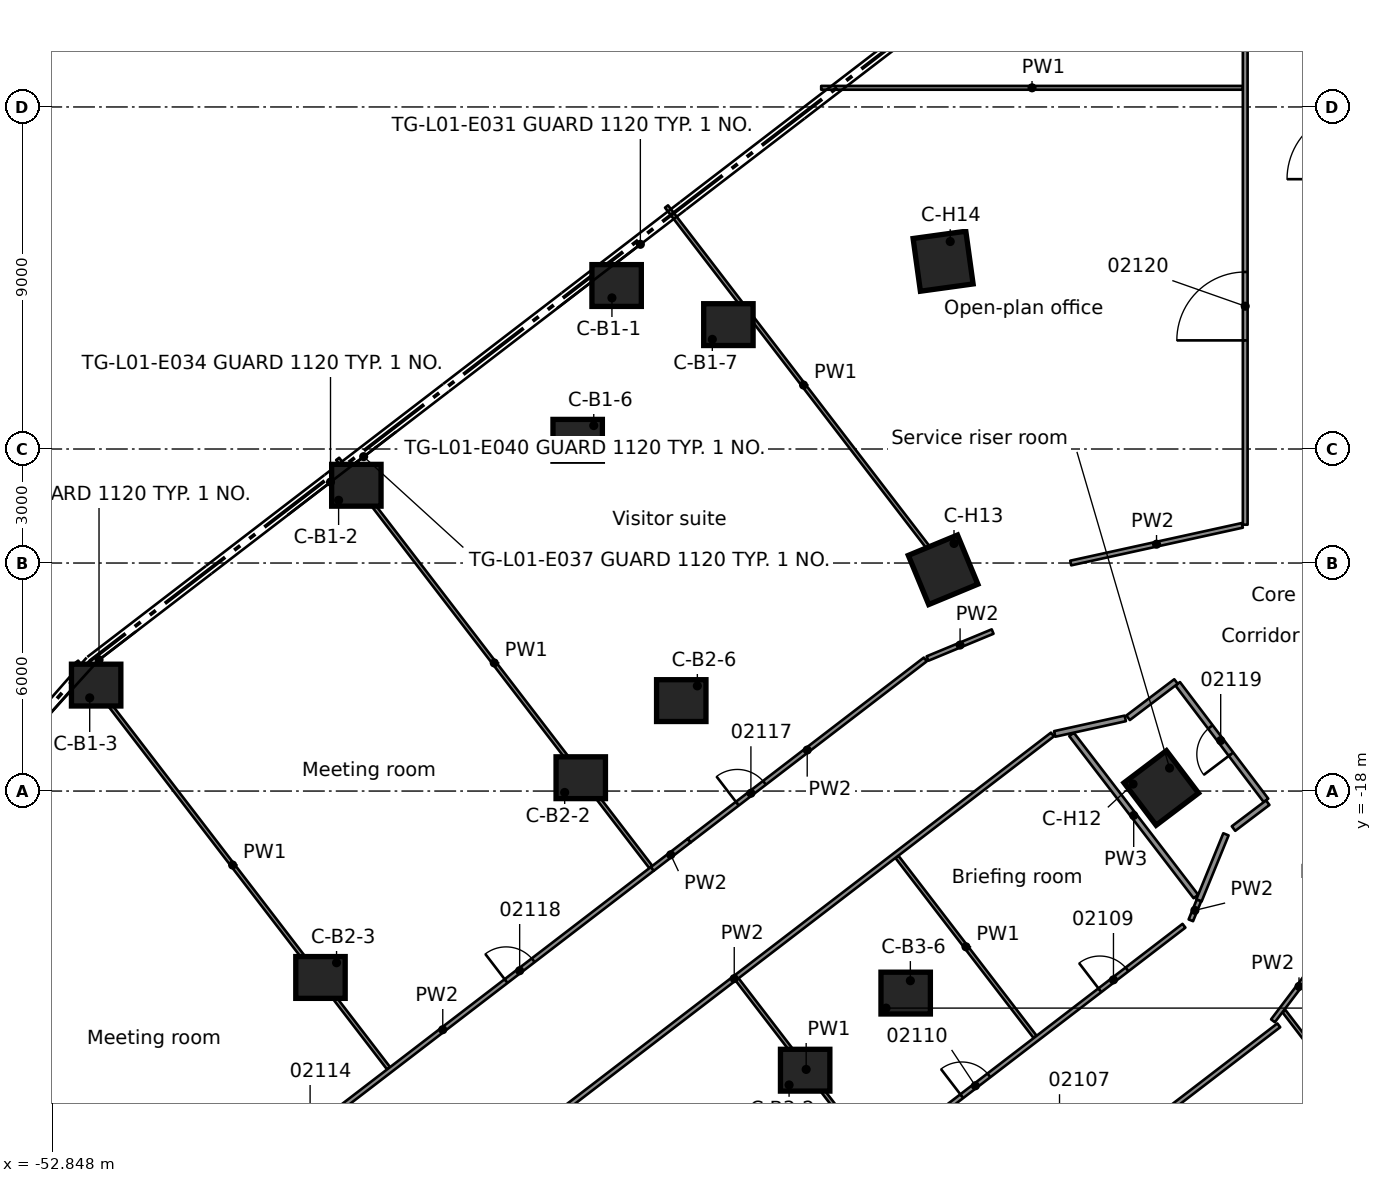
"""IFC4 building model, lengths in metres.
Left out: names, types, materials, properties, quantities, classifications, styles, units other than length and angle.
Written with IfcOpenShell. Run it as: python <this file> out.ifc"""

import sys

from ifc_helpers import new_model, si_unit, direction, frame, frame_2d, origin, origin_2d, place, context, subcontext, project, spatial, rectangle, extrude, element, fill, save


model = new_model("IFC4")
c1 = context("Model", 3, precision=1e-05, world=origin(), true_north=direction((0.0, 1.0)))
c2 = subcontext(c1, "Body", "Model", "MODEL_VIEW")
j1 = project(units=[si_unit("LENGTHUNIT", "METRE"), si_unit("PLANEANGLEUNIT", "RADIAN")], contexts=[c1])
p1 = place(None, origin())
s1 = spatial("IfcSite", under=j1, at=p1, CompositionType="ELEMENT")
p2 = place(p1, origin())
s2 = spatial("IfcBuilding", under=s1, at=p2, CompositionType="ELEMENT")
p3 = place(p2, frame((0.0, 0.0, 10.5)))
s3 = spatial("IfcBuildingStorey", under=s2, at=p3, CompositionType="ELEMENT", Elevation=10.5)
p4 = place(p3, frame((-37.991, -4.698, -1.0), z_axis=(0.0, 0.0, 1.0), x_axis=(0.707106781187, 0.707106781187, 0.0)))
e1 = element("IfcColumn", 1, at=p4, inside=s3, PredefinedType="COLUMN", context=c2, shape_type="SweptSolid", body=[
    extrude(rectangle(XDim=2.8, YDim=2.8, at=origin_2d()), origin(), (0.0, 0.0, 1.0), 1.0),
])
for number, where, z_axis, x_axis in (
    (2, (-44.84, -9.954, -1.0), (0.0, 0.0, 1.0), (0.707, 0.707, 0.0)),
    (3, (-51.687, -15.212, -1.0), (0.0, 0.0, 1.0), (0.707, 0.707, 0.0)),
    (4, (-54.884, -20.946, -1.0), (0.0, 0.0, 1.0), (0.707, 0.707, 0.0)),
    (5, (-39.016, -8.771, -1.0), (0.0, 0.0, 1.0), (0.707, 0.707, 0.0)),
):
    element("IfcColumn", number, at=place(p3, frame(where, z_axis=z_axis, x_axis=x_axis)), inside=s3, PredefinedType="COLUMN", context=c2, shape_type="SweptSolid", body=[
        extrude(rectangle(XDim=3.4, YDim=3.4, at=origin_2d()), origin(), (0.0, 0.0, 1.0), 1.0),
    ])
p5 = place(p3, frame((-35.05, -5.727, -1.0), z_axis=(0.0, 0.0, 1.0), x_axis=(0.707106781187, 0.707106781187, 0.0)))
e6 = element("IfcColumn", 6, at=p5, inside=s3, PredefinedType="COLUMN", context=c2, shape_type="SweptSolid", body=[
    extrude(rectangle(XDim=2.8, YDim=2.8, at=origin_2d()), origin(), (0.0, 0.0, 1.0), 1.0),
])
p6 = place(p3, frame((-38.935, -17.649, -1.0), z_axis=(0.0, 0.0, 1.0), x_axis=(0.707106781187, 0.707106781187, 0.0)))
e7 = element("IfcColumn", 7, at=p6, inside=s3, PredefinedType="COLUMN", context=c2, shape_type="SweptSolid", body=[
    extrude(rectangle(XDim=3.25, YDim=3.25, at=origin_2d()), origin(), (0.0, 0.0, 1.0), 1.0),
])
for number, where, z_axis, x_axis in (
    (8, (-45.784, -22.905, -1.0), (0.0, 0.0, 1.0), (0.707, 0.707, 0.0)),
    (9, (-52.633, -28.161, -1.0), (0.0, 0.0, 1.0), (0.707, 0.707, 0.0)),
):
    element("IfcColumn", number, at=place(p3, frame(where, z_axis=z_axis, x_axis=x_axis)), inside=s3, PredefinedType="COLUMN", context=c2, shape_type="SweptSolid", body=[
        extrude(rectangle(XDim=3.4, YDim=3.4, at=origin_2d()), origin(), (0.0, 0.0, 1.0), 1.0),
    ])
for number, where, z_axis, x_axis in (
    (10, (-36.29, -15.62, -1.0), (0.0, 0.0, 1.0), (0.707, 0.707, 0.0)),
    (11, (-33.03, -25.345, -1.0), (0.0, 0.0, 1.0), (0.707, 0.707, 0.0)),
    (12, (-30.385, -23.316, -1.0), (0.0, 0.0, 1.0), (0.707, 0.707, 0.0)),
):
    element("IfcColumn", number, at=place(p3, frame(where, z_axis=z_axis, x_axis=x_axis)), inside=s3, PredefinedType="COLUMN", context=c2, shape_type="SweptSolid", body=[
        extrude(rectangle(XDim=3.25, YDim=3.25, at=origin_2d()), origin(), (0.0, 0.0, 1.0), 1.0),
    ])
for number, where, z_axis, x_axis in (
    (13, (-20.99, -28.333, -1.0), (0.0, 0.0, 1.0), (0.707, 0.707, 0.0)),
    (14, (-17.919, -23.659, -1.0), (0.0, 0.0, 1.0), (0.707, 0.707, 0.0)),
    (15, (-23.659, -17.919, -1.0), (0.0, 0.0, 1.0), (0.707, 0.707, 0.0)),
    (16, (-29.4, -12.178, -1.0), (0.0, 0.0, 1.0), (0.707, 0.707, 0.0)),
    (17, (-29.4, -4.059, -1.0), (0.0, 0.0, 1.0), (0.707, 0.707, 0.0)),
):
    element("IfcColumn", number, at=place(p3, frame(where, z_axis=z_axis, x_axis=x_axis)), inside=s3, PredefinedType="COLUMN", context=c2, shape_type="SweptSolid", body=[
        extrude(rectangle(XDim=3.4, YDim=3.4, at=origin_2d()), origin(), (0.0, 0.0, 1.0), 1.0),
    ])
for number, where, z_axis, x_axis in (
    (18, (-37.991, -4.698, 0.0), (0.0, 0.0, 1.0), (1.0, 0.0, 0.0)),
    (19, (-44.84, -9.954, 0.0), (0.0, 0.0, 1.0), (1.0, 0.0, 0.0)),
    (20, (-51.687, -15.212, 0.0), (0.0, 0.0, 1.0), (1.0, 0.0, 0.0)),
    (21, (-39.016, -8.771, 0.0), (0.0, 0.0, 1.0), (1.0, 0.0, 0.0)),
    (22, (-35.05, -5.727, 0.0), (0.0, 0.0, 1.0), (1.0, 0.0, 0.0)),
    (23, (-38.935, -17.649, 0.0), (0.0, 0.0, 1.0), (1.0, 0.0, 0.0)),
    (24, (-45.784, -22.905, 0.0), (0.0, 0.0, 1.0), (1.0, 0.0, 0.0)),
    (25, (-36.29, -15.62, 0.0), (0.0, 0.0, 1.0), (1.0, 0.0, 0.0)),
    (26, (-33.03, -25.345, 0.0), (0.0, 0.0, 1.0), (1.0, 0.0, 0.0)),
    (27, (-30.385, -23.316, 0.0), (0.0, 0.0, 1.0), (1.0, 0.0, 0.0)),
):
    element("IfcColumn", number, at=place(p3, frame(where, z_axis=z_axis, x_axis=x_axis)), inside=s3, PredefinedType="COLUMN", context=c2, shape_type="SweptSolid", body=[
        extrude(rectangle(XDim=1.3, YDim=1.1, at=origin_2d()), origin(), (0.0, 0.0, 1.0), 5.0),
    ])
for number, where, z_axis, x_axis in (
    (28, (-23.659, -17.919, 0.0), (0.0, 0.0, 1.0), (-0.797, -0.604, 0.0)),
    (29, (-29.4, -12.178, 0.0), (0.0, 0.0, 1.0), (-0.924, -0.383, 0.0)),
    (30, (-29.4, -4.059, 0.0), (0.0, 0.0, 1.0), (-0.991, -0.137, 0.0)),
):
    element("IfcColumn", number, at=place(p3, frame(where, z_axis=z_axis, x_axis=x_axis)), inside=s3, PredefinedType="COLUMN", context=c2, shape_type="SweptSolid", body=[
        extrude(rectangle(XDim=1.4, YDim=1.4, at=origin_2d()), origin(), (0.0, 0.0, 1.0), 5.0),
    ])
p7 = place(p3, frame((-20.903, -18.246, 0.0), z_axis=(0.0, 0.0, 1.0), x_axis=(-0.603799066409, 0.797136555054, 0.0)))
e31 = element("IfcWall", 31, at=p7, inside=s3, PredefinedType="PARTITIONING", context=c2, shape_type="SweptSolid", body=[
    extrude(rectangle(XDim=3.849, YDim=0.15, at=frame_2d((1.924, 0.0))), origin(), (0.0, 0.0, 1.0), 4.58),
])
p8 = place(p7, frame((1.525, 0.0, 0.0)))
e32 = element("IfcOpeningElement", 32, at=p8, cuts=e31, PredefinedType="OPENING", context=c2, shape_type="SweptSolid", body=[
    extrude(rectangle(XDim=0.9, YDim=2.1, at=frame_2d((0.45, 1.05))), frame((0.0, 0.085, 0.0), z_axis=(0.0, -1.0, 0.0), x_axis=(1.0, 0.0, 0.0)), (0.0, 0.0, 1.0), 0.17),
])
p9 = place(p3, frame((-52.2, -14.599, 0.0), z_axis=(0.0, 0.0, 1.0), x_axis=(0.608835217765, -0.793296714735, 0.0)))
e33 = element("IfcWall", 33, at=p9, inside=s3, PredefinedType="PARTITIONING", context=c2, shape_type="SweptSolid", body=[
    extrude(rectangle(XDim=13.481, YDim=0.1, at=frame_2d((6.741, 0.0))), origin(), (0.0, 0.0, 1.0), 4.58),
])
p10 = place(p3, frame((-45.332, -9.26, 0.0), z_axis=(0.0, 0.0, 1.0), x_axis=(0.608825648604, -0.793304058733, 0.0)))
e34 = element("IfcWall", 34, at=p10, inside=s3, PredefinedType="PARTITIONING", context=c2, shape_type="SweptSolid", body=[
    extrude(rectangle(XDim=13.536, YDim=0.1, at=frame_2d((6.768, 0.0))), origin(), (0.0, 0.0, 1.0), 4.58),
])
p11 = place(p3, frame((-34.822, -22.955, 0.0), z_axis=(0.0, 0.0, 1.0), x_axis=(0.608823570319, -0.79330565372, 0.0)))
e35 = element("IfcWall", 35, at=p11, inside=s3, PredefinedType="PARTITIONING", context=c2, shape_type="SweptSolid", body=[
    extrude(rectangle(XDim=5.974, YDim=0.1, at=frame_2d((2.987, 0.0))), origin(), (0.0, 0.0, 1.0), 4.58),
])
p12 = place(p3, frame((-30.617, -19.729, 0.0), z_axis=(0.0, 0.0, 1.0), x_axis=(0.608902533452, -0.793245047104, 0.0)))
e36 = element("IfcWall", 36, at=p12, inside=s3, PredefinedType="PARTITIONING", context=c2, shape_type="SweptSolid", body=[
    extrude(rectangle(XDim=5.973, YDim=0.1, at=frame_2d((2.986, 0.0))), origin(), (0.0, 0.0, 1.0), 4.58),
])
p13 = place(p3, frame((-36.678, -2.619, 0.0), z_axis=(0.0, 0.0, 1.0), x_axis=(0.608769908396, -0.793346833757, 0.0)))
e37 = element("IfcWall", 37, at=p13, inside=s3, PredefinedType="PARTITIONING", context=c2, shape_type="SweptSolid", body=[
    extrude(rectangle(XDim=11.844, YDim=0.1, at=frame_2d((5.922, 0.0))), origin(), (0.0, 0.0, 1.0), 4.58),
])
p14 = place(p3, frame((-26.021, -16.509, 0.0), z_axis=(0.0, 0.0, 1.0), x_axis=(0.608806156611, -0.793319017592, 0.0)))
e38 = element("IfcWall", 38, at=p14, inside=s3, PredefinedType="PARTITIONING", context=c2, shape_type="SweptSolid", body=[
    extrude(rectangle(XDim=5.376, YDim=0.15, at=frame_2d((2.688, 0.0))), origin(), (0.0, 0.0, 1.0), 4.58),
])
p15 = place(p3, frame((-20.431, -23.791, 0.0), z_axis=(0.0, 0.0, 1.0), x_axis=(0.608708319694, -0.793394089678, 0.0)))
e39 = element("IfcWall", 39, at=p15, inside=s3, PredefinedType="PARTITIONING", context=c2, shape_type="SweptSolid", body=[
    extrude(rectangle(XDim=13.813, YDim=0.1, at=frame_2d((6.906, 0.0))), origin(), (0.0, 0.0, 1.0), 4.58),
])
p16 = place(p3, frame((-32.608, 0.504, 0.0), z_axis=(0.0, 0.0, 1.0), x_axis=(1.0, 0.0, 0.0)))
e40 = element("IfcWall", 40, at=p16, inside=s3, PredefinedType="PARTITIONING", context=c2, shape_type="SweptSolid", body=[
    extrude(rectangle(XDim=11.096, YDim=0.1, at=frame_2d((5.548, 0.0))), origin(), (0.0, 0.0, 1.0), 4.58),
])
p17 = place(p3, frame((-26.464, -16.497, 0.0), z_axis=(0.0, 0.0, 1.0), x_axis=(0.976601904513, 0.215055155954, 0.0)))
e41 = element("IfcWall", 41, at=p17, inside=s3, PredefinedType="PARTITIONING", context=c2, shape_type="SweptSolid", body=[
    extrude(rectangle(XDim=1.903, YDim=0.15, at=frame_2d((0.951, 0.0))), origin(), (0.0, 0.0, 1.0), 4.58),
])
p18 = place(p3, frame((-26.042, -12.0, 0.0), z_axis=(0.0, 0.0, 1.0), x_axis=(0.976761331961, 0.214329886822, 0.0)))
e42 = element("IfcWall", 42, at=p18, inside=s3, PredefinedType="PARTITIONING", context=c2, shape_type="SweptSolid", body=[
    extrude(rectangle(XDim=4.624, YDim=0.125, at=frame_2d((2.312, 0.0))), origin(), (0.0, 0.0, 1.0), 4.58),
])
p19 = place(p3, frame((-29.81, -14.513, 0.0), z_axis=(0.0, 0.0, 1.0), x_axis=(0.923811400228, 0.382847876851, 0.0)))
e43 = element("IfcWall", 43, at=p19, inside=s3, PredefinedType="PARTITIONING", context=c2, shape_type="SweptSolid", body=[
    extrude(rectangle(XDim=1.854, YDim=0.125, at=frame_2d((0.927, 0.0))), origin(), (0.0, 0.0, 1.0), 4.58),
])
p20 = place(p3, frame((-21.758, -18.987, 0.0), z_axis=(0.0, 0.0, 1.0), x_axis=(0.797423261737, 0.603420368931, 0.0)))
e44 = element("IfcWall", 44, at=p20, inside=s3, PredefinedType="PARTITIONING", context=c2, shape_type="SweptSolid", body=[
    extrude(rectangle(XDim=1.129, YDim=0.15, at=frame_2d((0.564, 0.0))), origin(), (0.0, 0.0, 1.0), 4.58),
])
p21 = place(p3, frame((-24.532, -16.072, 0.0), z_axis=(0.0, 0.0, 1.0), x_axis=(0.797229566058, 0.603676253469, 0.0)))
e45 = element("IfcWall", 45, at=p21, inside=s3, PredefinedType="PARTITIONING", context=c2, shape_type="SweptSolid", body=[
    extrude(rectangle(XDim=1.581, YDim=0.15, at=frame_2d((0.79, 0.0))), origin(), (0.0, 0.0, 1.0), 4.58),
])
p22 = place(p3, frame((-20.567, -24.164, 0.0), z_axis=(0.0, 0.0, 1.0), x_axis=(-0.793345387212, -0.608771793523, 0.0)))
e46 = element("IfcWall", 46, at=p22, inside=s3, PredefinedType="PARTITIONING", context=c2, shape_type="SweptSolid", body=[
    extrude(rectangle(XDim=9.353, YDim=0.125, at=frame_2d((4.677, 0.0))), origin(), (0.0, 0.0, 1.0), 4.58),
])
p23 = place(p22, frame((6.373, 0.0, 0.0)))
e47 = element("IfcOpeningElement", 47, at=p23, cuts=e46, PredefinedType="OPENING", context=c2, shape_type="SweptSolid", body=[
    extrude(rectangle(XDim=1.8, YDim=2.1, at=frame_2d((0.9, 1.05))), frame((0.0, 0.073, 0.0), z_axis=(0.0, -1.0, 0.0), x_axis=(1.0, 0.0, 0.0)), (0.0, 0.0, 1.0), 0.145),
])
p24 = place(p3, frame((-39.556, -34.196, 0.0), z_axis=(0.0, 0.0, 1.0), x_axis=(0.793448872505, 0.608636908773, 0.0)))
e48 = element("IfcWall", 48, at=p24, inside=s3, PredefinedType="PARTITIONING", context=c2, shape_type="SweptSolid", body=[
    extrude(rectangle(XDim=20.788, YDim=0.125, at=frame_2d((10.394, 0.0))), origin(), (0.0, 0.0, 1.0), 4.58),
])
p25 = place(p24, frame((18.0, 0.0, 0.0)))
e49 = element("IfcOpeningElement", 49, at=p25, cuts=e48, PredefinedType="OPENING", context=c2, shape_type="SweptSolid", body=[
    extrude(rectangle(XDim=0.9, YDim=2.1, at=frame_2d((0.45, 1.05))), frame((0.0, 0.073, 0.0), z_axis=(0.0, -1.0, 0.0), x_axis=(1.0, 0.0, 0.0)), (0.0, 0.0, 1.0), 0.145),
])
p26 = place(p24, frame((13.419, 0.0, 0.0)))
e50 = element("IfcOpeningElement", 50, at=p26, cuts=e48, PredefinedType="OPENING", context=c2, shape_type="SweptSolid", body=[
    extrude(rectangle(XDim=0.9, YDim=2.1, at=frame_2d((0.45, 1.05))), frame((0.0, 0.073, 0.0), z_axis=(0.0, -1.0, 0.0), x_axis=(1.0, 0.0, 0.0)), (0.0, 0.0, 1.0), 0.145),
])
p27 = place(p24, frame((5.749, 0.0, 0.0)))
e51 = element("IfcOpeningElement", 51, at=p27, cuts=e48, PredefinedType="OPENING", context=c2, shape_type="SweptSolid", body=[
    extrude(rectangle(XDim=0.9, YDim=2.1, at=frame_2d((0.45, 1.05))), frame((0.0, 0.073, 0.0), z_axis=(0.0, -1.0, 0.0), x_axis=(1.0, 0.0, 0.0)), (0.0, 0.0, 1.0), 0.145),
])
p28 = place(p3, frame((-43.269, -29.358, 0.0), z_axis=(0.0, 0.0, 1.0), x_axis=(0.793439885471, 0.608648624531, 0.0)))
e52 = element("IfcWall", 52, at=p28, inside=s3, PredefinedType="PARTITIONING", context=c2, shape_type="SweptSolid", body=[
    extrude(rectangle(XDim=21.106, YDim=0.125, at=frame_2d((10.553, 0.0))), origin(), (0.0, 0.0, 1.0), 4.58),
])
p29 = place(p3, frame((-48.08, -28.51, 0.0), z_axis=(0.0, 0.0, 1.0), x_axis=(0.793361206696, 0.608751177173, 0.0)))
e53 = element("IfcWall", 53, at=p29, inside=s3, PredefinedType="PARTITIONING", context=c2, shape_type="SweptSolid", body=[
    extrude(rectangle(XDim=13.9, YDim=0.125, at=frame_2d((6.95, 0.0))), origin(), (0.0, 0.0, 1.0), 4.58),
])
p30 = place(p29, frame((2.1, 0.0, 0.0)))
e54 = element("IfcOpeningElement", 54, at=p30, cuts=e53, PredefinedType="OPENING", context=c2, shape_type="SweptSolid", body=[
    extrude(rectangle(XDim=0.9, YDim=2.1, at=frame_2d((0.45, 1.05))), frame((0.0, 0.073, 0.0), z_axis=(0.0, -1.0, 0.0), x_axis=(1.0, 0.0, 0.0)), (0.0, 0.0, 1.0), 0.145),
])
p31 = place(p29, frame((9.051, 0.0, 0.0)))
e55 = element("IfcOpeningElement", 55, at=p31, cuts=e53, PredefinedType="OPENING", context=c2, shape_type="SweptSolid", body=[
    extrude(rectangle(XDim=0.9, YDim=2.1, at=frame_2d((0.45, 1.05))), frame((0.0, 0.073, 0.0), z_axis=(0.0, -1.0, 0.0), x_axis=(1.0, 0.0, 0.0)), (0.0, 0.0, 1.0), 0.145),
])
p32 = place(p3, frame((-36.084, -19.305, 0.0), z_axis=(0.0, 0.0, 1.0), x_axis=(0.793472416576, 0.60860621434, 0.0)))
e56 = element("IfcWall", 56, at=p32, inside=s3, PredefinedType="PARTITIONING", context=c2, shape_type="SweptSolid", body=[
    extrude(rectangle(XDim=7.834, YDim=0.125, at=frame_2d((3.917, 0.0))), origin(), (0.0, 0.0, 1.0), 4.58),
])
p33 = place(p32, frame((1.6, 0.0, 0.0)))
e57 = element("IfcOpeningElement", 57, at=p33, cuts=e56, PredefinedType="OPENING", context=c2, shape_type="SweptSolid", body=[
    extrude(rectangle(XDim=0.9, YDim=2.1, at=frame_2d((0.45, 1.05))), frame((0.0, 0.073, 0.0), z_axis=(0.0, -1.0, 0.0), x_axis=(1.0, 0.0, 0.0)), (0.0, 0.0, 1.0), 0.145),
])
p34 = place(p3, frame((-37.051, -20.048, 0.0), z_axis=(0.0, 0.0, 1.0), x_axis=(0.792906683767, 0.60934308139, 0.0)))
e58 = element("IfcWall", 58, at=p34, inside=s3, PredefinedType="PARTITIONING", context=c2, shape_type="SweptSolid", body=[
    extrude(rectangle(XDim=1.22, YDim=0.125, at=frame_2d((0.61, 0.0))), origin(), (0.0, 0.0, 1.0), 4.58),
])
p35 = place(p3, frame((-19.35, -22.237, 0.0), z_axis=(0.0, 0.0, 1.0), x_axis=(-0.603936432713, -0.797032486943, 0.0)))
e59 = element("IfcWall", 59, at=p35, inside=s3, PredefinedType="PARTITIONING", context=c2, shape_type="SweptSolid", body=[
    extrude(rectangle(XDim=2.268, YDim=0.125, at=frame_2d((1.134, 0.0))), origin(), (0.0, 0.0, 1.0), 4.58),
])
p36 = place(p3, frame((-22.668, -20.878, 0.0), z_axis=(0.0, 0.0, 1.0), x_axis=(0.378415254767, 0.925635940832, 0.0)))
e60 = element("IfcWall", 60, at=p36, inside=s3, PredefinedType="PARTITIONING", context=c2, shape_type="SweptSolid", body=[
    extrude(rectangle(XDim=1.879, YDim=0.15, at=frame_2d((0.939, 0.0))), origin(), (0.0, 0.0, 1.0), 4.58),
])
p37 = place(p3, frame((-22.881, -21.401, 0.0), z_axis=(0.0, 0.0, 1.0), x_axis=(0.377420478288, 0.926041998275, 0.0)))
e61 = element("IfcWall", 61, at=p37, inside=s3, PredefinedType="PARTITIONING", context=c2, shape_type="SweptSolid", body=[
    extrude(rectangle(XDim=0.565, YDim=0.125, at=frame_2d((0.282, 0.0))), origin(), (0.0, 0.0, 1.0), 4.58),
])
p38 = place(p3, frame((-21.45, -10.992, 0.0), z_axis=(0.0, 0.0, 1.0), x_axis=(0.0, 1.0, 0.0)))
e62 = element("IfcWall", 62, at=p38, inside=s3, PredefinedType="PARTITIONING", context=c2, shape_type="SweptSolid", body=[
    extrude(rectangle(XDim=25.443, YDim=0.125, at=frame_2d((12.721, 0.0))), origin(), (0.0, 0.0, 1.0), 4.58),
])
p39 = place(p38, frame((4.85, 0.0, 0.0)))
e63 = element("IfcOpeningElement", 63, at=p39, cuts=e62, PredefinedType="OPENING", context=c2, shape_type="SweptSolid", body=[
    extrude(rectangle(XDim=1.8, YDim=2.1, at=frame_2d((0.9, 1.05))), frame((0.0, 0.073, 0.0), z_axis=(0.0, -1.0, 0.0), x_axis=(1.0, 0.0, 0.0)), (0.0, 0.0, 1.0), 0.145),
])
p40 = place(p38, frame((16.596, 0.0, 0.0)))
e64 = element("IfcOpeningElement", 64, at=p40, cuts=e62, PredefinedType="OPENING", context=c2, shape_type="SweptSolid", body=[
    extrude(rectangle(XDim=1.1, YDim=2.1, at=frame_2d((0.55, 1.05))), frame((0.0, 0.073, 0.0), z_axis=(0.0, -1.0, 0.0), x_axis=(1.0, 0.0, 0.0)), (0.0, 0.0, 1.0), 0.145),
])
p41 = place(p25, origin())
e65 = element("IfcDoor", 65, at=p41, inside=s3, OperationType="SINGLE_SWING_RIGHT", PredefinedType="DOOR", context=c2, shape_type="SweptSolid", body=[
    extrude(rectangle(XDim=0.9, YDim=2.1, at=frame_2d((0.45, 1.05))), frame((0.0, 0.025, 0.0), z_axis=(0.0, -1.0, 0.0), x_axis=(1.0, 0.0, 0.0)), (0.0, 0.0, 1.0), 0.05),
])
fill(e49, e65)
p42 = place(p26, origin())
e66 = element("IfcDoor", 66, at=p42, inside=s3, OperationType="SINGLE_SWING_RIGHT", PredefinedType="DOOR", context=c2, shape_type="SweptSolid", body=[
    extrude(rectangle(XDim=0.9, YDim=2.1, at=frame_2d((0.45, 1.05))), frame((0.0, 0.025, 0.0), z_axis=(0.0, -1.0, 0.0), x_axis=(1.0, 0.0, 0.0)), (0.0, 0.0, 1.0), 0.05),
])
fill(e50, e66)
p43 = place(p33, origin())
e67 = element("IfcDoor", 67, at=p43, inside=s3, OperationType="SINGLE_SWING_LEFT", PredefinedType="DOOR", context=c2, shape_type="SweptSolid", body=[
    extrude(rectangle(XDim=0.9, YDim=2.1, at=frame_2d((0.45, 1.05))), frame((0.0, 0.025, 0.0), z_axis=(0.0, -1.0, 0.0), x_axis=(1.0, 0.0, 0.0)), (0.0, 0.0, 1.0), 0.05),
])
fill(e57, e67)
p44 = place(p31, origin())
e68 = element("IfcDoor", 68, at=p44, inside=s3, OperationType="SINGLE_SWING_RIGHT", PredefinedType="DOOR", context=c2, shape_type="SweptSolid", body=[
    extrude(rectangle(XDim=0.9, YDim=2.1, at=frame_2d((0.45, 1.05))), frame((0.0, 0.025, 0.0), z_axis=(0.0, -1.0, 0.0), x_axis=(1.0, 0.0, 0.0)), (0.0, 0.0, 1.0), 0.05),
])
fill(e55, e68)
p45 = place(p8, origin())
e69 = element("IfcDoor", 69, at=p45, inside=s3, OperationType="SINGLE_SWING_RIGHT", PredefinedType="DOOR", context=c2, shape_type="SweptSolid", body=[
    extrude(rectangle(XDim=0.9, YDim=2.1, at=frame_2d((0.45, 1.05))), frame((0.0, 0.025, 0.0), z_axis=(0.0, -1.0, 0.0), x_axis=(1.0, 0.0, 0.0)), (0.0, 0.0, 1.0), 0.05),
])
fill(e32, e69)
p46 = place(p39, origin())
e70 = element("IfcDoor", 70, at=p46, inside=s3, OperationType="DOUBLE_DOOR_SINGLE_SWING", PredefinedType="DOOR", context=c2, shape_type="SweptSolid", body=[
    extrude(rectangle(XDim=1.8, YDim=2.1, at=frame_2d((0.9, 1.05))), frame((0.0, 0.025, 0.0), z_axis=(0.0, -1.0, 0.0), x_axis=(1.0, 0.0, 0.0)), (0.0, 0.0, 1.0), 0.05),
])
fill(e63, e70)
save(model, sys.argv[1])
